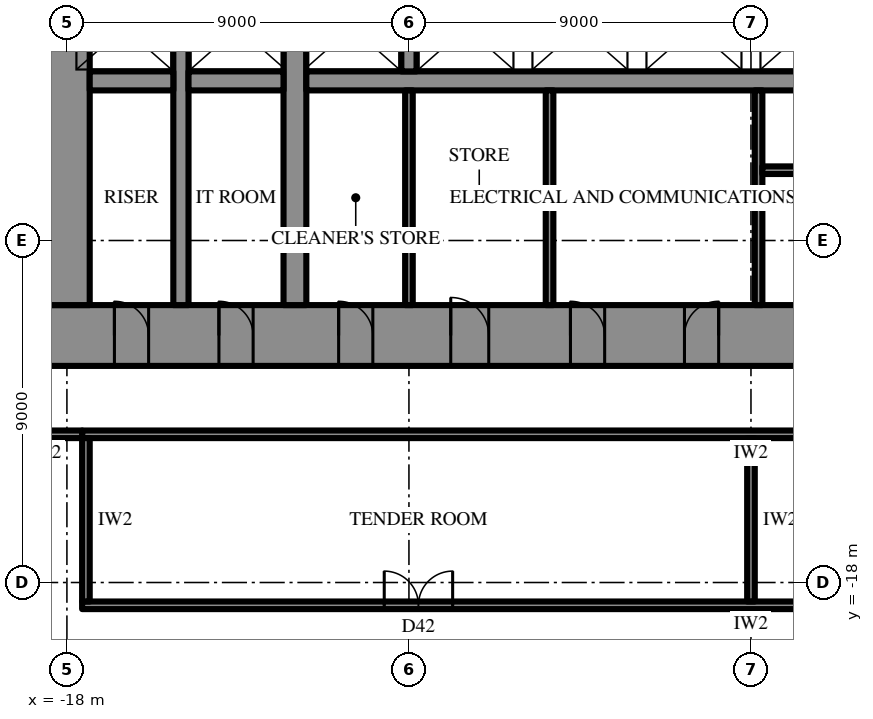
"""IFC4 building model, lengths in metres.
Left out: names, types, materials, properties, quantities, classifications, styles, units other than length and angle.
Written with IfcOpenShell. Run it as: python <this file> out.ifc"""

import sys

from ifc_helpers import new_model, si_unit, direction, frame, frame_2d, origin, place, context, subcontext, project, spatial, rectangle, extrude, element, fill, save


model = new_model("IFC4")
c1 = context("Model", 3, precision=1e-05, world=origin(), true_north=direction((0.0, 1.0)))
c2 = subcontext(c1, "Body", "Model", "MODEL_VIEW")
j1 = project(units=[si_unit("LENGTHUNIT", "METRE"), si_unit("PLANEANGLEUNIT", "RADIAN")], contexts=[c1])
p1 = place(None, origin())
s1 = spatial("IfcSite", under=j1, at=p1, CompositionType="ELEMENT")
p2 = place(p1, origin())
s2 = spatial("IfcBuilding", under=s1, at=p2, CompositionType="ELEMENT")
p3 = place(p2, frame((0.0, 0.0, 73.9)))
s3 = spatial("IfcBuildingStorey", under=s2, at=p3, CompositionType="ELEMENT", Elevation=73.9)
p4 = place(p3, frame((18.6, -11.5, 0.0), z_axis=(0.0, 0.0, 1.0), x_axis=(-1.0, 0.0, 0.0)))
e1 = element("IfcWall", 1, at=p4, inside=s3, PredefinedType="SHEAR", context=c2, shape_type="SweptSolid", body=[
    extrude(rectangle(XDim=37.2, YDim=1.6, at=frame_2d((18.6, 0.0))), origin(), (0.0, 0.0, 1.0), 4.2),
])
p5 = place(p4, frame((19.45, 0.0, 0.0)))
e2 = element("IfcOpeningElement", 2, at=p5, cuts=e1, PredefinedType="OPENING", context=c2, shape_type="SweptSolid", body=[
    extrude(rectangle(XDim=0.9, YDim=2.2, at=frame_2d((0.45, 1.1))), frame((0.0, 0.81, 0.0), z_axis=(0.0, -1.0, 0.0), x_axis=(1.0, 0.0, 0.0)), (0.0, 0.0, 1.0), 1.62),
])
p6 = place(p4, frame((22.45, 0.0, 0.0)))
e3 = element("IfcOpeningElement", 3, at=p6, cuts=e1, PredefinedType="OPENING", context=c2, shape_type="SweptSolid", body=[
    extrude(rectangle(XDim=0.9, YDim=2.2, at=frame_2d((0.45, 1.1))), frame((0.0, 0.81, 0.0), z_axis=(0.0, -1.0, 0.0), x_axis=(1.0, 0.0, 0.0)), (0.0, 0.0, 1.0), 1.62),
])
p7 = place(p4, frame((25.5, 0.0, 0.0)))
e4 = element("IfcOpeningElement", 4, at=p7, cuts=e1, PredefinedType="OPENING", context=c2, shape_type="SweptSolid", body=[
    extrude(rectangle(XDim=1.0, YDim=2.2, at=frame_2d((0.5, 1.1))), frame((0.0, 0.81, 0.0), z_axis=(0.0, -1.0, 0.0), x_axis=(1.0, 0.0, 0.0)), (0.0, 0.0, 1.0), 1.62),
])
p8 = place(p4, frame((1.85, 0.0, 0.0)))
e5 = element("IfcOpeningElement", 5, at=p8, cuts=e1, PredefinedType="OPENING", context=c2, shape_type="SweptSolid", body=[
    extrude(rectangle(XDim=0.9, YDim=2.2, at=frame_2d((0.45, 1.1))), frame((0.0, 0.81, 0.0), z_axis=(0.0, -1.0, 0.0), x_axis=(1.0, 0.0, 0.0)), (0.0, 0.0, 1.0), 1.62),
])
p9 = place(p4, frame((4.6, 0.0, 0.0)))
e6 = element("IfcOpeningElement", 6, at=p9, cuts=e1, PredefinedType="OPENING", context=c2, shape_type="SweptSolid", body=[
    extrude(rectangle(XDim=0.9, YDim=2.2, at=frame_2d((0.45, 1.1))), frame((0.0, 0.81, 0.0), z_axis=(0.0, -1.0, 0.0), x_axis=(1.0, 0.0, 0.0)), (0.0, 0.0, 1.0), 1.62),
])
p10 = place(p4, frame((7.75, 0.0, 0.0)))
e7 = element("IfcOpeningElement", 7, at=p10, cuts=e1, PredefinedType="OPENING", context=c2, shape_type="SweptSolid", body=[
    extrude(rectangle(XDim=0.9, YDim=2.2, at=frame_2d((0.45, 1.1))), frame((0.0, 0.81, 0.0), z_axis=(0.0, -1.0, 0.0), x_axis=(1.0, 0.0, 0.0)), (0.0, 0.0, 1.0), 1.62),
])
p11 = place(p4, frame((28.55, 0.0, 0.0)))
e8 = element("IfcOpeningElement", 8, at=p11, cuts=e1, PredefinedType="OPENING", context=c2, shape_type="SweptSolid", body=[
    extrude(rectangle(XDim=0.9, YDim=2.2, at=frame_2d((0.45, 1.1))), frame((0.0, 0.81, 0.0), z_axis=(0.0, -1.0, 0.0), x_axis=(1.0, 0.0, 0.0)), (0.0, 0.0, 1.0), 1.62),
])
p12 = place(p4, frame((31.7, 0.0, 0.0)))
e9 = element("IfcOpeningElement", 9, at=p12, cuts=e1, PredefinedType="OPENING", context=c2, shape_type="SweptSolid", body=[
    extrude(rectangle(XDim=0.9, YDim=2.2, at=frame_2d((0.45, 1.1))), frame((0.0, 0.81, 0.0), z_axis=(0.0, -1.0, 0.0), x_axis=(1.0, 0.0, 0.0)), (0.0, 0.0, 1.0), 1.62),
])
p13 = place(p4, frame((34.45, 0.0, 0.0)))
e10 = element("IfcOpeningElement", 10, at=p13, cuts=e1, PredefinedType="OPENING", context=c2, shape_type="SweptSolid", body=[
    extrude(rectangle(XDim=0.9, YDim=2.2, at=frame_2d((0.45, 1.1))), frame((0.0, 0.81, 0.0), z_axis=(0.0, -1.0, 0.0), x_axis=(1.0, 0.0, 0.0)), (0.0, 0.0, 1.0), 1.62),
])
p14 = place(p3, frame((-18.0, 10.7, 0.0), z_axis=(0.0, 0.0, 1.0), x_axis=(0.0, -1.0, 0.0)))
e11 = element("IfcWall", 11, at=p14, inside=s3, PredefinedType="SHEAR", context=c2, shape_type="SweptSolid", body=[
    extrude(rectangle(XDim=21.4, YDim=1.2, at=frame_2d((10.7, 0.0))), origin(), (0.0, 0.0, 1.0), 4.2),
])
p15 = place(p14, frame((9.8, 0.0, 0.0)))
e12 = element("IfcOpeningElement", 12, at=p15, cuts=e11, PredefinedType="OPENING", context=c2, shape_type="SweptSolid", body=[
    extrude(rectangle(XDim=1.8, YDim=2.4, at=frame_2d((0.9, 1.2))), frame((0.0, 0.61, 0.0), z_axis=(0.0, -1.0, 0.0), x_axis=(1.0, 0.0, 0.0)), (0.0, 0.0, 1.0), 1.22),
])
p16 = place(p3, frame((-12.0, -10.7, 0.0), z_axis=(0.0, 0.0, 1.0), x_axis=(0.0, 1.0, 0.0)))
e13 = element("IfcWall", 13, at=p16, inside=s3, PredefinedType="SHEAR", context=c2, shape_type="SweptSolid", body=[
    extrude(rectangle(XDim=21.4, YDim=0.6, at=frame_2d((10.7, 0.0))), origin(), (0.0, 0.0, 1.0), 4.2),
])
p17 = place(p16, frame((9.8, 0.0, 0.0)))
e14 = element("IfcOpeningElement", 14, at=p17, cuts=e13, PredefinedType="OPENING", context=c2, shape_type="SweptSolid", body=[
    extrude(rectangle(XDim=1.8, YDim=2.4, at=frame_2d((0.9, 1.2))), frame((0.0, 0.31, 0.0), z_axis=(0.0, -1.0, 0.0), x_axis=(1.0, 0.0, 0.0)), (0.0, 0.0, 1.0), 0.62),
])
p18 = place(p3, frame((-15.0, -10.7, 0.0), z_axis=(0.0, 0.0, 1.0), x_axis=(0.0, 1.0, 0.0)))
e15 = element("IfcWall", 15, at=p18, inside=s3, PredefinedType="SHEAR", context=c2, shape_type="SweptSolid", body=[
    extrude(rectangle(XDim=21.4, YDim=0.4, at=frame_2d((10.7, 0.0))), origin(), (0.0, 0.0, 1.0), 4.2),
])
p19 = place(p18, frame((9.8, 0.0, 0.0)))
e16 = element("IfcOpeningElement", 16, at=p19, cuts=e15, PredefinedType="OPENING", context=c2, shape_type="SweptSolid", body=[
    extrude(rectangle(XDim=1.8, YDim=2.4, at=frame_2d((0.9, 1.2))), frame((0.0, 0.21, 0.0), z_axis=(0.0, -1.0, 0.0), x_axis=(1.0, 0.0, 0.0)), (0.0, 0.0, 1.0), 0.42),
])
p20 = place(p3, frame((11.7, -4.8, 0.0), z_axis=(0.0, 0.0, 1.0), x_axis=(-1.0, 0.0, 0.0)))
e17 = element("IfcWall", 17, at=p20, inside=s3, PredefinedType="SHEAR", context=c2, shape_type="SweptSolid", body=[
    extrude(rectangle(XDim=23.4, YDim=0.5, at=frame_2d((11.7, 0.0))), origin(), (0.0, 0.0, 1.0), 4.2),
])
p21 = place(p20, frame((6.6, 0.0, 0.0)))
e18 = element("IfcOpeningElement", 18, at=p21, cuts=e17, PredefinedType="OPENING", context=c2, shape_type="SweptSolid", body=[
    extrude(rectangle(XDim=1.2, YDim=2.2, at=frame_2d((0.6, 1.1))), frame((0.0, 0.26, 0.0), z_axis=(0.0, -1.0, 0.0), x_axis=(1.0, 0.0, 0.0)), (0.0, 0.0, 1.0), 0.52),
])
p22 = place(p20, frame((3.6, 0.0, 0.0)))
e19 = element("IfcOpeningElement", 19, at=p22, cuts=e17, PredefinedType="OPENING", context=c2, shape_type="SweptSolid", body=[
    extrude(rectangle(XDim=1.2, YDim=2.2, at=frame_2d((0.6, 1.1))), frame((0.0, 0.26, 0.0), z_axis=(0.0, -1.0, 0.0), x_axis=(1.0, 0.0, 0.0)), (0.0, 0.0, 1.0), 0.52),
])
p23 = place(p3, frame((-12.3, -4.8, 0.0), z_axis=(0.0, 0.0, 1.0), x_axis=(-1.0, 0.0, 0.0)))
e20 = element("IfcWall", 20, at=p23, inside=s3, PredefinedType="SHEAR", context=c2, shape_type="SweptSolid", body=[
    extrude(rectangle(XDim=2.5, YDim=0.5, at=frame_2d((1.25, 0.0))), origin(), (0.0, 0.0, 1.0), 4.2),
])
p24 = place(p3, frame((-15.2, -4.8, 0.0), z_axis=(0.0, 0.0, 1.0), x_axis=(-1.0, 0.0, 0.0)))
e21 = element("IfcWall", 21, at=p24, inside=s3, PredefinedType="SHEAR", context=c2, shape_type="SweptSolid", body=[
    extrude(rectangle(XDim=2.2, YDim=0.5, at=frame_2d((1.1, 0.0))), origin(), (0.0, 0.0, 1.0), 4.2),
])
p25 = place(p3, frame((-9.0, -2.25, 0.0), z_axis=(0.0, 0.0, 1.0), x_axis=(0.0, -1.0, 0.0)))
e22 = element("IfcWall", 22, at=p25, inside=s3, PredefinedType="SHEAR", context=c2, shape_type="SweptSolid", body=[
    extrude(rectangle(XDim=2.3, YDim=0.4, at=frame_2d((1.15, 0.0))), origin(), (0.0, 0.0, 1.0), 4.2),
])
p26 = place(p3, frame((0.2, -5.05, 0.0), z_axis=(0.0, 0.0, 1.0), x_axis=(0.0, -1.0, 0.0)))
e23 = element("IfcWall", 23, at=p26, inside=s3, PredefinedType="SHEAR", context=c2, shape_type="SweptSolid", body=[
    extrude(rectangle(XDim=5.65, YDim=0.2, at=frame_2d((2.825, 0.0))), origin(), (0.0, 0.0, 1.0), 4.2),
])
p27 = place(p3, frame((8.9, -7.15, 0.0), z_axis=(0.0, 0.0, 1.0), x_axis=(-1.0, 0.0, 0.0)))
e24 = element("IfcWall", 24, at=p27, inside=s3, PredefinedType="SHEAR", context=c2, shape_type="SweptSolid", body=[
    extrude(rectangle(XDim=8.6, YDim=0.2, at=frame_2d((4.3, 0.0))), origin(), (0.0, 0.0, 1.0), 4.2),
])
p28 = place(p27, frame((0.3, 0.0, 0.0)))
e25 = element("IfcOpeningElement", 25, at=p28, cuts=e24, PredefinedType="OPENING", context=c2, shape_type="SweptSolid", body=[
    extrude(rectangle(XDim=1.0, YDim=2.2, at=frame_2d((0.5, 1.1))), frame((0.0, 0.11, 0.0), z_axis=(0.0, -1.0, 0.0), x_axis=(1.0, 0.0, 0.0)), (0.0, 0.0, 1.0), 0.22),
])
for number, where, z_axis, x_axis in (
    (26, (-9.0, -5.05, 0.0), (0.0, 0.0, 1.0), (0.0, -1.0, 0.0)),
    (27, (-5.3, -5.05, 0.0), (0.0, 0.0, 1.0), (0.0, -1.0, 0.0)),
):
    element("IfcWall", number, at=place(p3, frame(where, z_axis=z_axis, x_axis=x_axis)), inside=s3, PredefinedType="PARTITIONING", context=c2, shape_type="SweptSolid", body=[
        extrude(rectangle(XDim=5.65, YDim=0.2, at=frame_2d((2.825, 0.0))), origin(), (0.0, 0.0, 1.0), 4.0),
    ])
p29 = place(p3, frame((17.6, -14.1, 0.0), z_axis=(0.0, 0.0, 1.0), x_axis=(-1.0, 0.0, 0.0)))
e28 = element("IfcWall", 28, at=p29, inside=s3, PredefinedType="PARTITIONING", context=c2, shape_type="SweptSolid", body=[
    extrude(rectangle(XDim=35.2, YDim=0.2, at=frame_2d((17.6, 0.0))), origin(), (0.0, 0.0, 1.0), 4.0),
])
p30 = place(p3, frame((17.6, -18.6, 0.0), z_axis=(0.0, 0.0, 1.0), x_axis=(-1.0, 0.0, 0.0)))
e29 = element("IfcWall", 29, at=p30, inside=s3, PredefinedType="PARTITIONING", context=c2, shape_type="SweptSolid", body=[
    extrude(rectangle(XDim=35.2, YDim=0.2, at=frame_2d((17.6, 0.0))), origin(), (0.0, 0.0, 1.0), 4.0),
])
p31 = place(p30, frame((7.95, 0.0, 0.0)))
e30 = element("IfcOpeningElement", 30, at=p31, cuts=e29, PredefinedType="OPENING", context=c2, shape_type="SweptSolid", body=[
    extrude(rectangle(XDim=1.8, YDim=2.4, at=frame_2d((0.9, 1.2))), frame((0.0, 0.11, 0.0), z_axis=(0.0, -1.0, 0.0), x_axis=(1.0, 0.0, 0.0)), (0.0, 0.0, 1.0), 0.22),
])
p32 = place(p30, frame((25.45, 0.0, 0.0)))
e31 = element("IfcOpeningElement", 31, at=p32, cuts=e29, PredefinedType="OPENING", context=c2, shape_type="SweptSolid", body=[
    extrude(rectangle(XDim=1.8, YDim=2.4, at=frame_2d((0.9, 1.2))), frame((0.0, 0.11, 0.0), z_axis=(0.0, -1.0, 0.0), x_axis=(1.0, 0.0, 0.0)), (0.0, 0.0, 1.0), 0.22),
])
p33 = place(p3, frame((0.0, -14.2, 0.0), z_axis=(0.0, 0.0, 1.0), x_axis=(0.0, -1.0, 0.0)))
e32 = element("IfcWall", 32, at=p33, inside=s3, PredefinedType="PARTITIONING", context=c2, shape_type="SweptSolid", body=[
    extrude(rectangle(XDim=4.3, YDim=0.2, at=frame_2d((2.15, 0.0))), origin(), (0.0, 0.0, 1.0), 2.944),
])
p34 = place(p3, frame((-17.5, -14.2, 0.0), z_axis=(0.0, 0.0, 1.0), x_axis=(0.0, -1.0, 0.0)))
e33 = element("IfcWall", 33, at=p34, inside=s3, PredefinedType="PARTITIONING", context=c2, shape_type="SweptSolid", body=[
    extrude(rectangle(XDim=4.3, YDim=0.2, at=frame_2d((2.15, 0.0))), origin(), (0.0, 0.0, 1.0), 4.0),
])
p35 = place(p3, frame((-17.6, -14.1, 0.0), z_axis=(0.0, 0.0, 1.0), x_axis=(-1.0, 0.0, 0.0)))
e34 = element("IfcWall", 34, at=p35, inside=s3, PredefinedType="PARTITIONING", context=c2, shape_type="SweptSolid", body=[
    extrude(rectangle(XDim=2.0, YDim=0.2, at=frame_2d((1.0, 0.0))), origin(), (0.0, 0.0, 1.0), 4.0),
])
p36 = place(p5, frame((0.9, 0.0, 0.0), z_axis=(0.0, 0.0, 1.0), x_axis=(-1.0, 0.0, 0.0)))
e35 = element("IfcDoor", 35, at=p36, inside=s3, OperationType="SINGLE_SWING_LEFT", PredefinedType="DOOR", context=c2, shape_type="SweptSolid", body=[
    extrude(rectangle(XDim=0.9, YDim=2.2, at=frame_2d((0.45, 1.1))), frame((0.0, 0.025, 0.0), z_axis=(0.0, -1.0, 0.0), x_axis=(1.0, 0.0, 0.0)), (0.0, 0.0, 1.0), 0.05),
])
fill(e2, e35)
p37 = place(p6, frame((0.9, 0.0, 0.0), z_axis=(0.0, 0.0, 1.0), x_axis=(-1.0, 0.0, 0.0)))
e36 = element("IfcDoor", 36, at=p37, inside=s3, OperationType="SINGLE_SWING_RIGHT", PredefinedType="DOOR", context=c2, shape_type="SweptSolid", body=[
    extrude(rectangle(XDim=0.9, YDim=2.2, at=frame_2d((0.45, 1.1))), frame((0.0, 0.025, 0.0), z_axis=(0.0, -1.0, 0.0), x_axis=(1.0, 0.0, 0.0)), (0.0, 0.0, 1.0), 0.05),
])
fill(e3, e36)
p38 = place(p7, frame((1.0, 0.0, 0.0), z_axis=(0.0, 0.0, 1.0), x_axis=(-1.0, 0.0, 0.0)))
e37 = element("IfcDoor", 37, at=p38, inside=s3, OperationType="SINGLE_SWING_RIGHT", PredefinedType="DOOR", context=c2, shape_type="SweptSolid", body=[
    extrude(rectangle(XDim=1.0, YDim=2.2, at=frame_2d((0.5, 1.1))), frame((0.0, 0.025, 0.0), z_axis=(0.0, -1.0, 0.0), x_axis=(1.0, 0.0, 0.0)), (0.0, 0.0, 1.0), 0.05),
])
fill(e4, e37)
p39 = place(p11, frame((0.9, 0.0, 0.0), z_axis=(0.0, 0.0, 1.0), x_axis=(-1.0, 0.0, 0.0)))
e38 = element("IfcDoor", 38, at=p39, inside=s3, OperationType="SINGLE_SWING_RIGHT", PredefinedType="DOOR", context=c2, shape_type="SweptSolid", body=[
    extrude(rectangle(XDim=0.9, YDim=2.2, at=frame_2d((0.45, 1.1))), frame((0.0, 0.025, 0.0), z_axis=(0.0, -1.0, 0.0), x_axis=(1.0, 0.0, 0.0)), (0.0, 0.0, 1.0), 0.05),
])
fill(e8, e38)
p40 = place(p12, frame((0.9, 0.0, 0.0), z_axis=(0.0, 0.0, 1.0), x_axis=(-1.0, 0.0, 0.0)))
e39 = element("IfcDoor", 39, at=p40, inside=s3, OperationType="SINGLE_SWING_RIGHT", PredefinedType="DOOR", context=c2, shape_type="SweptSolid", body=[
    extrude(rectangle(XDim=0.9, YDim=2.2, at=frame_2d((0.45, 1.1))), frame((0.0, 0.025, 0.0), z_axis=(0.0, -1.0, 0.0), x_axis=(1.0, 0.0, 0.0)), (0.0, 0.0, 1.0), 0.05),
])
fill(e9, e39)
p41 = place(p13, frame((0.9, 0.0, 0.0), z_axis=(0.0, 0.0, 1.0), x_axis=(-1.0, 0.0, 0.0)))
e40 = element("IfcDoor", 40, at=p41, inside=s3, OperationType="SINGLE_SWING_RIGHT", PredefinedType="DOOR", context=c2, shape_type="SweptSolid", body=[
    extrude(rectangle(XDim=0.9, YDim=2.2, at=frame_2d((0.45, 1.1))), frame((0.0, 0.025, 0.0), z_axis=(0.0, -1.0, 0.0), x_axis=(1.0, 0.0, 0.0)), (0.0, 0.0, 1.0), 0.05),
])
fill(e10, e40)
p42 = place(p32, frame((1.8, 0.0, 0.0), z_axis=(0.0, 0.0, 1.0), x_axis=(-1.0, 0.0, 0.0)))
e41 = element("IfcDoor", 41, at=p42, inside=s3, OperationType="DOUBLE_DOOR_SINGLE_SWING", PredefinedType="DOOR", context=c2, shape_type="SweptSolid", body=[
    extrude(rectangle(XDim=1.8, YDim=2.4, at=frame_2d((0.9, 1.2))), frame((0.0, 0.025, 0.0), z_axis=(0.0, -1.0, 0.0), x_axis=(1.0, 0.0, 0.0)), (0.0, 0.0, 1.0), 0.05),
])
fill(e31, e41)
save(model, sys.argv[1])
